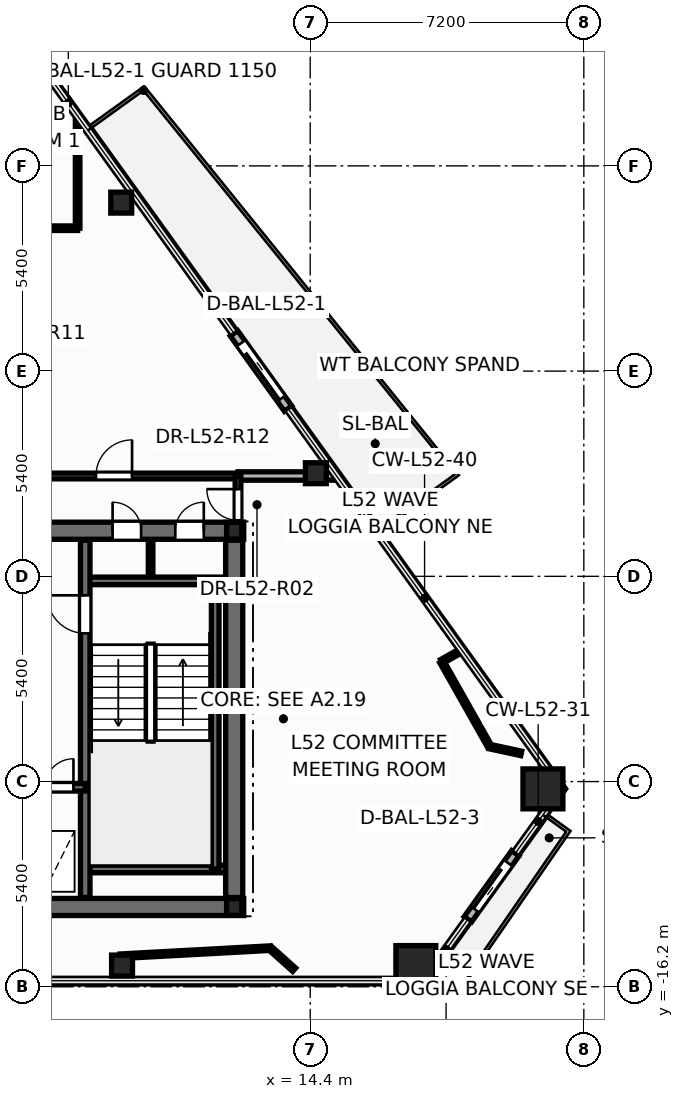
"""IFC4 building model, lengths in metres.
Left out: names, types, materials, properties, quantities, classifications, styles, units other than length and angle.
Written with IfcOpenShell. Run it as: python <this file> out.ifc"""

import sys

from ifc_helpers import new_model, si_unit, direction, frame, frame_2d, origin, origin_2d, place, context, subcontext, project, spatial, rectangle, hollow_rectangle, hollow_circle, i_section, extrude, element, fill, save


model = new_model("IFC4")
c1 = context("Model", 3, precision=1e-05, world=origin(), true_north=direction((0.0, 1.0)))
c2 = subcontext(c1, "Body", "Model", "MODEL_VIEW")
j1 = project(units=[si_unit("LENGTHUNIT", "METRE"), si_unit("PLANEANGLEUNIT", "RADIAN")], contexts=[c1])
p1 = place(None, origin())
s1 = spatial("IfcSite", under=j1, at=p1, CompositionType="ELEMENT")
p2 = place(p1, origin())
s2 = spatial("IfcBuilding", under=s1, at=p2, CompositionType="ELEMENT")
p3 = place(p2, frame((0.0, 0.0, 200.1)))
s3 = spatial("IfcBuildingStorey", under=s2, at=p3, CompositionType="ELEMENT", Elevation=200.1)
for number, where, z_axis, x_axis in (
    (1, (17.18, -15.641, 0.0), (0.0, 0.0, 1.0), (1.0, 0.0, 0.0)),
    (2, (20.524, -10.992, 0.0), (0.0, 0.0, 1.0), (1.0, 0.0, 0.0)),
):
    element("IfcColumn", number, at=place(p3, frame(where, z_axis=z_axis, x_axis=x_axis)), inside=s3, PredefinedType="COLUMN", context=c2, shape_type="SweptSolid", body=[
        extrude(hollow_rectangle(XDim=1.05, YDim=1.05, WallThickness=0.045, at=origin_2d()), origin(), (0.0, 0.0, 1.0), 3.6),
    ])
for number, where, z_axis, x_axis in (
    (3, (9.449, -15.641, 0.0), (0.0, 0.0, 1.0), (1.0, 0.0, 0.0)),
    (4, (14.549, -2.686, 0.0), (0.0, 0.0, 1.0), (1.0, 0.0, 0.0)),
    (5, (9.427, 4.433, 0.0), (0.0, 0.0, 1.0), (1.0, 0.0, 0.0)),
):
    element("IfcColumn", number, at=place(p3, frame(where, z_axis=z_axis, x_axis=x_axis)), inside=s3, PredefinedType="COLUMN", context=c2, shape_type="SweptSolid", body=[
        extrude(hollow_circle(Radius=0.275, WallThickness=0.024, at=origin_2d()), origin(), (0.0, 0.0, 1.0), 3.6),
    ])
for number, where, z_axis, x_axis in (
    (6, (12.4, -14.1, 0.0), (0.0, 0.0, 1.0), (1.0, 0.0, 0.0)),
    (7, (12.4, -4.2, 0.0), (0.0, 0.0, 1.0), (1.0, 0.0, 0.0)),
):
    element("IfcColumn", number, at=place(p3, frame(where, z_axis=z_axis, x_axis=x_axis)), inside=s3, PredefinedType="COLUMN", context=c2, shape_type="SweptSolid", body=[
        extrude(i_section(OverallWidth=0.4, OverallDepth=0.44, WebThickness=0.028, FlangeThickness=0.04, at=origin_2d()), origin(), (0.0, 0.0, 1.0), 3.6),
    ])
p4 = place(p3, frame((13.819, -0.987, -0.015), z_axis=(0.0, 0.0, 1.0), x_axis=(-0.583951454754, 0.811788579921, 0.0)))
e8 = element("IfcWall", 8, at=p4, inside=s3, PredefinedType="STANDARD", context=c2, shape_type="SweptSolid", body=[
    extrude(rectangle(XDim=2.44, YDim=0.24, at=frame_2d((1.22, 0.0))), origin(), (0.0, 0.0, 1.0), 2.802),
])
p5 = place(p4, frame((0.32, 0.0, 0.015)))
e9 = element("IfcOpeningElement", 9, at=p5, cuts=e8, PredefinedType="OPENING", context=c2, shape_type="SweptSolid", body=[
    extrude(rectangle(XDim=1.806, YDim=2.204, at=frame_2d((0.9, 1.102))), frame((0.0, 0.13, 0.0), z_axis=(0.0, -1.0, 0.0), x_axis=(1.0, 0.0, 0.0)), (0.0, 0.0, 1.0), 0.26),
])
p6 = place(p3, frame((18.548, -14.424, -0.015), z_axis=(0.0, 0.0, 1.0), x_axis=(0.583965085393, 0.811778774693, 0.0)))
e10 = element("IfcWall", 10, at=p6, inside=s3, PredefinedType="STANDARD", context=c2, shape_type="SweptSolid", body=[
    extrude(rectangle(XDim=2.14, YDim=0.24, at=frame_2d((1.07, 0.0))), origin(), (0.0, 0.0, 1.0), 2.802),
])
p7 = place(p6, frame((0.32, 0.0, 0.015)))
e11 = element("IfcOpeningElement", 11, at=p7, cuts=e10, PredefinedType="OPENING", context=c2, shape_type="SweptSolid", body=[
    extrude(rectangle(XDim=1.506, YDim=2.204, at=frame_2d((0.75, 1.102))), frame((0.0, 0.13, 0.0), z_axis=(0.0, -1.0, 0.0), x_axis=(1.0, 0.0, 0.0)), (0.0, 0.0, 1.0), 0.26),
])
p8 = place(p3, frame((10.2, -5.52, 0.0), z_axis=(0.0, 0.0, 1.0), x_axis=(0.0, 1.0, 0.0)))
e12 = element("IfcWall", 12, at=p8, inside=s3, PredefinedType="PARTITIONING", context=c2, shape_type="SweptSolid", body=[
    extrude(rectangle(XDim=1.12, YDim=0.12, at=frame_2d((0.56, 0.0))), origin(), (0.0, 0.0, 1.0), 3.345),
])
p9 = place(p3, frame((-12.65, -14.1, 0.0), z_axis=(0.0, 0.0, 1.0), x_axis=(1.0, 0.0, 0.0)))
e13 = element("IfcWall", 13, at=p9, inside=s3, PredefinedType="SHEAR", context=c2, shape_type="SweptSolid", body=[
    extrude(rectangle(XDim=25.3, YDim=0.45, at=frame_2d((12.65, 0.0))), origin(), (0.0, 0.0, 1.0), 3.6),
])
p10 = place(p3, frame((-12.65, -4.2, 0.0), z_axis=(0.0, 0.0, 1.0), x_axis=(1.0, 0.0, 0.0)))
e14 = element("IfcWall", 14, at=p10, inside=s3, PredefinedType="SHEAR", context=c2, shape_type="SweptSolid", body=[
    extrude(rectangle(XDim=25.3, YDim=0.45, at=frame_2d((12.65, 0.0))), origin(), (0.0, 0.0, 1.0), 3.6),
])
p11 = place(p10, frame((1.85, 0.0, 0.0)))
e15 = element("IfcOpeningElement", 15, at=p11, cuts=e14, PredefinedType="OPENING", context=c2, shape_type="SweptSolid", body=[
    extrude(rectangle(XDim=0.756, YDim=2.054, at=frame_2d((0.375, 1.027))), frame((0.0, 0.235, 0.0), z_axis=(0.0, -1.0, 0.0), x_axis=(1.0, 0.0, 0.0)), (0.0, 0.0, 1.0), 0.47),
])
p12 = place(p10, frame((21.85, 0.0, 0.0)))
e16 = element("IfcOpeningElement", 16, at=p12, cuts=e14, PredefinedType="OPENING", context=c2, shape_type="SweptSolid", body=[
    extrude(rectangle(XDim=0.756, YDim=2.054, at=frame_2d((0.375, 1.027))), frame((0.0, 0.235, 0.0), z_axis=(0.0, -1.0, 0.0), x_axis=(1.0, 0.0, 0.0)), (0.0, 0.0, 1.0), 0.47),
])
p13 = place(p10, frame((23.5, 0.0, 0.0)))
e17 = element("IfcOpeningElement", 17, at=p13, cuts=e14, PredefinedType="OPENING", context=c2, shape_type="SweptSolid", body=[
    extrude(rectangle(XDim=0.756, YDim=2.054, at=frame_2d((0.375, 1.027))), frame((0.0, 0.235, 0.0), z_axis=(0.0, -1.0, 0.0), x_axis=(1.0, 0.0, 0.0)), (0.0, 0.0, 1.0), 0.47),
])
p14 = place(p10, frame((5.85, 0.0, 0.0)))
e18 = element("IfcOpeningElement", 18, at=p14, cuts=e14, PredefinedType="OPENING", context=c2, shape_type="SweptSolid", body=[
    extrude(rectangle(XDim=1.006, YDim=2.104, at=frame_2d((0.5, 1.052))), frame((0.0, 0.235, 0.0), z_axis=(0.0, -1.0, 0.0), x_axis=(1.0, 0.0, 0.0)), (0.0, 0.0, 1.0), 0.47),
])
p15 = place(p10, frame((10.35, 0.0, 0.0)))
e19 = element("IfcOpeningElement", 19, at=p15, cuts=e14, PredefinedType="OPENING", context=c2, shape_type="SweptSolid", body=[
    extrude(rectangle(XDim=1.406, YDim=2.154, at=frame_2d((0.7, 1.077))), frame((0.0, 0.235, 0.0), z_axis=(0.0, -1.0, 0.0), x_axis=(1.0, 0.0, 0.0)), (0.0, 0.0, 1.0), 0.47),
])
p16 = place(p10, frame((18.45, 0.0, 0.0)))
e20 = element("IfcOpeningElement", 20, at=p16, cuts=e14, PredefinedType="OPENING", context=c2, shape_type="SweptSolid", body=[
    extrude(rectangle(XDim=1.006, YDim=2.104, at=frame_2d((0.5, 1.052))), frame((0.0, 0.235, 0.0), z_axis=(0.0, -1.0, 0.0), x_axis=(1.0, 0.0, 0.0)), (0.0, 0.0, 1.0), 0.47),
])
for number, where, z_axis, x_axis in (
    (21, (8.48, -5.52, 0.0), (0.0, 0.0, 1.0), (1.0, 0.0, 0.0)),
    (22, (8.48, -13.1, 0.0), (0.0, 0.0, 1.0), (1.0, 0.0, 0.0)),
):
    element("IfcWall", number, at=place(p3, frame(where, z_axis=z_axis, x_axis=x_axis)), inside=s3, PredefinedType="SOLIDWALL", context=c2, shape_type="SweptSolid", body=[
        extrude(rectangle(XDim=3.87, YDim=0.2, at=frame_2d((1.935, 0.0))), origin(), (0.0, 0.0, 1.0), 3.6),
    ])
p17 = place(p3, frame((11.9, -13.1, 0.0), z_axis=(0.0, 0.0, 1.0), x_axis=(0.0, 1.0, 0.0)))
e23 = element("IfcWall", 23, at=p17, inside=s3, PredefinedType="SOLIDWALL", context=c2, shape_type="SweptSolid", body=[
    extrude(rectangle(XDim=7.58, YDim=0.2, at=frame_2d((3.79, 0.0))), origin(), (0.0, 0.0, 1.0), 3.6),
])
p18 = place(p3, frame((8.48, -13.85, 0.0), z_axis=(0.0, 0.0, 1.0), x_axis=(0.0, 1.0, 0.0)))
e24 = element("IfcWall", 24, at=p18, inside=s3, PredefinedType="SHEAR", context=c2, shape_type="SweptSolid", body=[
    extrude(rectangle(XDim=9.4, YDim=0.25, at=frame_2d((4.7, 0.0))), origin(), (0.0, 0.0, 1.0), 3.6),
])
p19 = place(p18, frame((6.95, 0.0, 0.0)))
e25 = element("IfcOpeningElement", 25, at=p19, cuts=e24, PredefinedType="OPENING", context=c2, shape_type="SweptSolid", body=[
    extrude(rectangle(XDim=1.006, YDim=2.104, at=frame_2d((0.5, 1.052))), frame((0.0, 0.135, 0.0), z_axis=(0.0, -1.0, 0.0), x_axis=(1.0, 0.0, 0.0)), (0.0, 0.0, 1.0), 0.27),
])
p20 = place(p3, frame((5.12, -10.95, 0.0), z_axis=(0.0, 0.0, 1.0), x_axis=(1.0, 0.0, 0.0)))
e26 = element("IfcWall", 26, at=p20, inside=s3, PredefinedType="SOLIDWALL", context=c2, shape_type="SweptSolid", body=[
    extrude(rectangle(XDim=3.36, YDim=0.2, at=frame_2d((1.68, 0.0))), origin(), (0.0, 0.0, 1.0), 3.6),
])
p21 = place(p20, frame((0.42, 0.0, 0.0)))
e27 = element("IfcOpeningElement", 27, at=p21, cuts=e26, PredefinedType="OPENING", context=c2, shape_type="SweptSolid", body=[
    extrude(rectangle(XDim=1.106, YDim=2.104, at=frame_2d((0.55, 1.052))), frame((0.0, 0.11, 0.0), z_axis=(0.0, -1.0, 0.0), x_axis=(1.0, 0.0, 0.0)), (0.0, 0.0, 1.0), 0.22),
])
p22 = place(p20, frame((2.3, 0.0, 0.0)))
e28 = element("IfcOpeningElement", 28, at=p22, cuts=e26, PredefinedType="OPENING", context=c2, shape_type="SweptSolid", body=[
    extrude(rectangle(XDim=0.756, YDim=2.054, at=frame_2d((0.375, 1.027))), frame((0.0, 0.11, 0.0), z_axis=(0.0, -1.0, 0.0), x_axis=(1.0, 0.0, 0.0)), (0.0, 0.0, 1.0), 0.22),
])
p23 = place(p3, frame((12.4, -13.85, 0.0), z_axis=(0.0, 0.0, 1.0), x_axis=(0.0, 1.0, 0.0)))
e29 = element("IfcWall", 29, at=p23, inside=s3, PredefinedType="SHEAR", context=c2, shape_type="SweptSolid", body=[
    extrude(rectangle(XDim=9.4, YDim=0.45, at=frame_2d((4.7, 0.0))), origin(), (0.0, 0.0, 1.0), 3.6),
])
p24 = place(p3, frame((4.74, -2.76, 0.0), z_axis=(0.0, 0.0, 1.0), x_axis=(1.0, 0.0, 0.0)))
e30 = element("IfcWall", 30, at=p24, inside=s3, PredefinedType="PARTITIONING", context=c2, shape_type="SweptSolid", body=[
    extrude(rectangle(XDim=7.76, YDim=0.15, at=frame_2d((3.88, 0.0))), origin(), (0.0, 0.0, 1.0), 2.32),
])
p25 = place(p24, frame((4.022, 0.0, 0.0)))
e31 = element("IfcOpeningElement", 31, at=p25, cuts=e30, PredefinedType="OPENING", context=c2, shape_type="SweptSolid", body=[
    extrude(rectangle(XDim=0.956, YDim=2.104, at=frame_2d((0.475, 1.052))), frame((0.0, 0.085, 0.0), z_axis=(0.0, -1.0, 0.0), x_axis=(1.0, 0.0, 0.0)), (0.0, 0.0, 1.0), 0.17),
])
p26 = place(p3, frame((4.8, 3.76, 0.0), z_axis=(0.0, 0.0, 1.0), x_axis=(1.0, 0.0, 0.0)))
e32 = element("IfcWall", 32, at=p26, inside=s3, PredefinedType="PARTITIONING", context=c2, shape_type="SweptSolid", body=[
    extrude(rectangle(XDim=3.48, YDim=0.12, at=frame_2d((1.74, 0.0))), origin(), (0.0, 0.0, 1.0), 2.32),
])
p27 = place(p26, frame((0.32, 0.0, 0.0)))
e33 = element("IfcOpeningElement", 33, at=p27, cuts=e32, PredefinedType="OPENING", context=c2, shape_type="SweptSolid", body=[
    extrude(rectangle(XDim=0.926, YDim=2.104, at=frame_2d((0.46, 1.052))), frame((0.0, 0.07, 0.0), z_axis=(0.0, -1.0, 0.0), x_axis=(1.0, 0.0, 0.0)), (0.0, 0.0, 1.0), 0.14),
])
p28 = place(p3, frame((9.398, -15.396, 0.0), z_axis=(0.0, 0.0, 1.0), x_axis=(0.998542273278, 0.053975258015, 0.0)))
e34 = element("IfcWall", 34, at=p28, inside=s3, PredefinedType="PARTITIONING", context=c2, shape_type="SweptSolid", body=[
    extrude(rectangle(XDim=3.953, YDim=0.12, at=frame_2d((1.977, 0.0))), origin(), (0.0, 0.0, 1.0), 2.32),
])
p29 = place(p3, frame((8.28, 3.76, 0.0), z_axis=(0.0, 0.0, 1.0), x_axis=(0.0, 1.0, 0.0)))
e35 = element("IfcWall", 35, at=p29, inside=s3, PredefinedType="PARTITIONING", context=c2, shape_type="SweptSolid", body=[
    extrude(rectangle(XDim=2.953, YDim=0.12, at=frame_2d((1.477, 0.0))), origin(), (0.0, 0.0, 1.0), 2.32),
])
p30 = place(p3, frame((12.5, -2.76, 0.0), z_axis=(0.0, 0.0, 1.0), x_axis=(1.0, 0.0, 0.0)))
e36 = element("IfcWall", 36, at=p30, inside=s3, PredefinedType="PARTITIONING", context=c2, shape_type="SweptSolid", body=[
    extrude(rectangle(XDim=2.595, YDim=0.22, at=frame_2d((1.297, 0.0))), origin(), (0.0, 0.0, 1.0), 2.32),
])
p31 = place(p3, frame((19.125, -9.88, 0.0), z_axis=(0.0, 0.0, 1.0), x_axis=(-0.491919564627, 0.87064065029, 0.0)))
e37 = element("IfcWall", 37, at=p31, inside=s3, PredefinedType="PARTITIONING", context=c2, shape_type="SweptSolid", body=[
    extrude(rectangle(XDim=2.571, YDim=0.12, at=frame_2d((1.285, 0.0))), origin(), (0.0, 0.0, 1.0), 2.32),
])
p32 = place(p3, frame((12.5, -4.24, 0.0), z_axis=(0.0, 0.0, 1.0), x_axis=(0.0, 1.0, 0.0)))
e38 = element("IfcWall", 38, at=p32, inside=s3, PredefinedType="PARTITIONING", context=c2, shape_type="SweptSolid", body=[
    extrude(rectangle(XDim=1.48, YDim=0.15, at=frame_2d((0.74, 0.0))), origin(), (0.0, 0.0, 1.0), 2.32),
])
p33 = place(p32, frame((0.315, 0.0, 0.0)))
e39 = element("IfcOpeningElement", 39, at=p33, cuts=e38, PredefinedType="OPENING", context=c2, shape_type="SweptSolid", body=[
    extrude(rectangle(XDim=0.826, YDim=2.104, at=frame_2d((0.41, 1.052))), frame((0.0, 0.085, 0.0), z_axis=(0.0, -1.0, 0.0), x_axis=(1.0, 0.0, 0.0)), (0.0, 0.0, 1.0), 0.17),
])
p34 = place(p3, frame((13.345, -15.183, 0.0), z_axis=(0.0, 0.0, 1.0), x_axis=(0.744707356433, -0.667391154627, 0.0)))
e40 = element("IfcWall", 40, at=p34, inside=s3, PredefinedType="PARTITIONING", context=c2, shape_type="SweptSolid", body=[
    extrude(rectangle(XDim=0.849, YDim=0.12, at=frame_2d((0.425, 0.0))), origin(), (0.0, 0.0, 1.0), 2.787),
])
p35 = place(p3, frame((19.953, -10.059, 0.0), z_axis=(0.0, 0.0, 1.0), x_axis=(-0.977582693279, 0.210551841127, 0.0)))
e41 = element("IfcWall", 41, at=p35, inside=s3, PredefinedType="PARTITIONING", context=c2, shape_type="SweptSolid", body=[
    extrude(rectangle(XDim=0.848, YDim=0.12, at=frame_2d((0.424, 0.0))), origin(), (0.0, 0.0, 1.0), 2.32),
])
p36 = place(p3, frame((9.432, -16.031, 0.0), z_axis=(0.0, 0.0, 1.0), x_axis=(-0.053788890406, 0.99855232976, 0.0)))
e42 = element("IfcWall", 42, at=p36, inside=s3, PredefinedType="PARTITIONING", context=c2, shape_type="SweptSolid", body=[
    extrude(rectangle(XDim=0.635, YDim=0.12, at=frame_2d((0.318, 0.0))), origin(), (0.0, 0.0, 1.0), 2.32),
])
p37 = place(p3, frame((17.86, -7.642, 0.0), z_axis=(0.0, 0.0, 1.0), x_axis=(0.87056283872, 0.492057256668, 0.0)))
e43 = element("IfcWall", 43, at=p37, inside=s3, PredefinedType="PARTITIONING", context=c2, shape_type="SweptSolid", body=[
    extrude(rectangle(XDim=0.6, YDim=0.12, at=frame_2d((0.3, 0.0))), origin(), (0.0, 0.0, 1.0), 2.787),
])
p38 = place(p5, origin())
e44 = element("IfcDoor", 44, at=p38, inside=s3, OperationType="SLIDING_TO_LEFT", PredefinedType="DOOR", context=c2, shape_type="SweptSolid", body=[
    extrude(rectangle(XDim=1.8, YDim=2.2, at=frame_2d((0.9, 1.1))), frame((0.0, 0.025, 0.0), z_axis=(0.0, -1.0, 0.0), x_axis=(1.0, 0.0, 0.0)), (0.0, 0.0, 1.0), 0.05),
])
fill(e9, e44)
p39 = place(p7, origin())
e45 = element("IfcDoor", 45, at=p39, inside=s3, OperationType="SLIDING_TO_RIGHT", PredefinedType="DOOR", context=c2, shape_type="SweptSolid", body=[
    extrude(rectangle(XDim=1.5, YDim=2.2, at=frame_2d((0.75, 1.1))), frame((0.0, 0.025, 0.0), z_axis=(0.0, -1.0, 0.0), x_axis=(1.0, 0.0, 0.0)), (0.0, 0.0, 1.0), 0.05),
])
fill(e11, e45)
p40 = place(p19, origin())
e46 = element("IfcDoor", 46, at=p40, inside=s3, OperationType="SINGLE_SWING_RIGHT", PredefinedType="DOOR", context=c2, shape_type="SweptSolid", body=[
    extrude(rectangle(XDim=1.0, YDim=2.1, at=frame_2d((0.5, 1.05))), frame((0.0, 0.025, 0.0), z_axis=(0.0, -1.0, 0.0), x_axis=(1.0, 0.0, 0.0)), (0.0, 0.0, 1.0), 0.05),
])
fill(e25, e46)
p41 = place(p22, origin())
e47 = element("IfcDoor", 47, at=p41, inside=s3, OperationType="SINGLE_SWING_RIGHT", PredefinedType="DOOR", context=c2, shape_type="SweptSolid", body=[
    extrude(rectangle(XDim=0.75, YDim=2.05, at=frame_2d((0.375, 1.025))), frame((0.0, 0.025, 0.0), z_axis=(0.0, -1.0, 0.0), x_axis=(1.0, 0.0, 0.0)), (0.0, 0.0, 1.0), 0.05),
])
fill(e28, e47)
p42 = place(p12, origin())
e48 = element("IfcDoor", 48, at=p42, inside=s3, OperationType="SINGLE_SWING_LEFT", PredefinedType="DOOR", context=c2, shape_type="SweptSolid", body=[
    extrude(rectangle(XDim=0.75, YDim=2.05, at=frame_2d((0.375, 1.025))), frame((0.0, 0.025, 0.0), z_axis=(0.0, -1.0, 0.0), x_axis=(1.0, 0.0, 0.0)), (0.0, 0.0, 1.0), 0.05),
])
fill(e16, e48)
p43 = place(p13, origin())
e49 = element("IfcDoor", 49, at=p43, inside=s3, OperationType="SINGLE_SWING_RIGHT", PredefinedType="DOOR", context=c2, shape_type="SweptSolid", body=[
    extrude(rectangle(XDim=0.75, YDim=2.05, at=frame_2d((0.375, 1.025))), frame((0.0, 0.025, 0.0), z_axis=(0.0, -1.0, 0.0), x_axis=(1.0, 0.0, 0.0)), (0.0, 0.0, 1.0), 0.05),
])
fill(e17, e49)
p44 = place(p33, origin())
e50 = element("IfcDoor", 50, at=p44, inside=s3, OperationType="SINGLE_SWING_RIGHT", PredefinedType="DOOR", context=c2, shape_type="SweptSolid", body=[
    extrude(rectangle(XDim=0.82, YDim=2.1, at=frame_2d((0.41, 1.05))), frame((0.0, 0.025, 0.0), z_axis=(0.0, -1.0, 0.0), x_axis=(1.0, 0.0, 0.0)), (0.0, 0.0, 1.0), 0.05),
])
fill(e39, e50)
p45 = place(p25, origin())
e51 = element("IfcDoor", 51, at=p45, inside=s3, OperationType="SINGLE_SWING_RIGHT", PredefinedType="DOOR", context=c2, shape_type="SweptSolid", body=[
    extrude(rectangle(XDim=0.95, YDim=2.1, at=frame_2d((0.475, 1.05))), frame((0.0, 0.025, 0.0), z_axis=(0.0, -1.0, 0.0), x_axis=(1.0, 0.0, 0.0)), (0.0, 0.0, 1.0), 0.05),
])
fill(e31, e51)
save(model, sys.argv[1])
